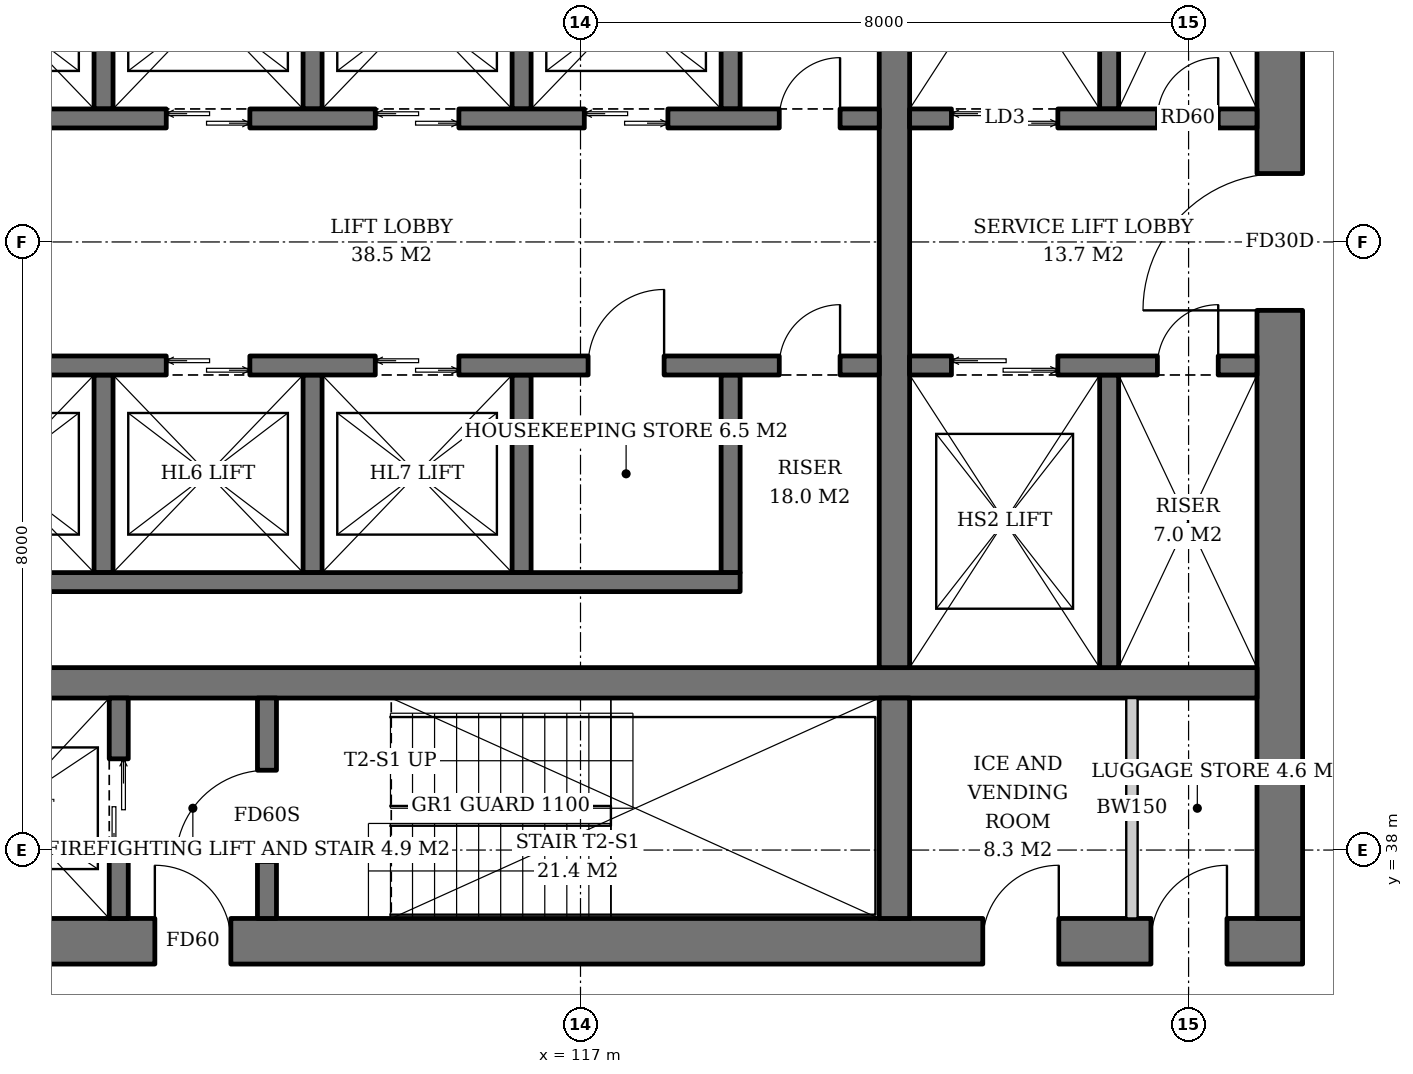
"""IFC4 building model, lengths in metres.
Left out: names, types, materials, properties, quantities, classifications, styles, units other than length and angle.
Written with IfcOpenShell. Run it as: python <this file> out.ifc"""

import sys

from ifc_helpers import new_model, si_unit, direction, frame, frame_2d, origin, place, context, subcontext, project, spatial, rectangle, extrude, element, fill, save


model = new_model("IFC4")
c1 = context("Model", 3, precision=1e-05, world=origin(), true_north=direction((0.0, 1.0)))
c2 = subcontext(c1, "Body", "Model", "MODEL_VIEW")
j1 = project(units=[si_unit("LENGTHUNIT", "METRE"), si_unit("PLANEANGLEUNIT", "RADIAN")], contexts=[c1])
p1 = place(None, origin())
s1 = spatial("IfcSite", under=j1, at=p1, CompositionType="ELEMENT")
p2 = place(p1, origin())
s2 = spatial("IfcBuilding", under=s1, at=p2, CompositionType="ELEMENT")
p3 = place(p2, frame((0.0, 0.0, 104.6)))
s3 = spatial("IfcBuildingStorey", under=s2, at=p3, CompositionType="ELEMENT", Elevation=104.6)
p4 = place(p3, frame((107.5, 36.8, 0.0), z_axis=(0.0, 0.0, 1.0), x_axis=(1.0, 0.0, 0.0)))
e1 = element("IfcWall", 1, at=p4, inside=s3, PredefinedType="SHEAR", context=c2, shape_type="SweptSolid", body=[
    extrude(rectangle(XDim=19.0, YDim=0.6, at=frame_2d((9.5, 0.0))), origin(), (0.0, 0.0, 1.0), 3.8),
])
p5 = place(p4, frame((3.9, 0.0, 0.0)))
e2 = element("IfcOpeningElement", 2, at=p5, cuts=e1, PredefinedType="OPENING", context=c2, shape_type="SweptSolid", body=[
    extrude(rectangle(XDim=1.0, YDim=2.1, at=frame_2d((0.5, 1.05))), frame((0.0, 0.31, 0.0), z_axis=(0.0, -1.0, 0.0), x_axis=(1.0, 0.0, 0.0)), (0.0, 0.0, 1.0), 0.62),
])
p6 = place(p4, frame((14.792, 0.0, 0.0)))
e3 = element("IfcOpeningElement", 3, at=p6, cuts=e1, PredefinedType="OPENING", context=c2, shape_type="SweptSolid", body=[
    extrude(rectangle(XDim=1.0, YDim=2.1, at=frame_2d((0.5, 1.05))), frame((0.0, 0.31, 0.0), z_axis=(0.0, -1.0, 0.0), x_axis=(1.0, 0.0, 0.0)), (0.0, 0.0, 1.0), 0.62),
])
p7 = place(p4, frame((17.005, 0.0, 0.0)))
e4 = element("IfcOpeningElement", 4, at=p7, cuts=e1, PredefinedType="OPENING", context=c2, shape_type="SweptSolid", body=[
    extrude(rectangle(XDim=1.0, YDim=2.1, at=frame_2d((0.5, 1.05))), frame((0.0, 0.31, 0.0), z_axis=(0.0, -1.0, 0.0), x_axis=(1.0, 0.0, 0.0)), (0.0, 0.0, 1.0), 0.62),
])
p8 = place(p3, frame((126.2, 37.1, 0.0), z_axis=(0.0, 0.0, 1.0), x_axis=(0.0, 1.0, 0.0)))
e5 = element("IfcWall", 5, at=p8, inside=s3, PredefinedType="SHEAR", context=c2, shape_type="SweptSolid", body=[
    extrude(rectangle(XDim=17.8, YDim=0.6, at=frame_2d((8.9, 0.0))), origin(), (0.0, 0.0, 1.0), 3.8),
])
p9 = place(p8, frame((8.0, 0.0, 0.0)))
e6 = element("IfcOpeningElement", 6, at=p9, cuts=e5, PredefinedType="OPENING", context=c2, shape_type="SweptSolid", body=[
    extrude(rectangle(XDim=1.8, YDim=2.4, at=frame_2d((0.9, 1.2))), frame((0.0, 0.31, 0.0), z_axis=(0.0, -1.0, 0.0), x_axis=(1.0, 0.0, 0.0)), (0.0, 0.0, 1.0), 0.62),
])
p10 = place(p3, frame((108.1, 40.2, 0.0), z_axis=(0.0, 0.0, 1.0), x_axis=(1.0, 0.0, 0.0)))
e7 = element("IfcWall", 7, at=p10, inside=s3, PredefinedType="SHEAR", context=c2, shape_type="SweptSolid", body=[
    extrude(rectangle(XDim=17.8, YDim=0.4, at=frame_2d((8.9, 0.0))), origin(), (0.0, 0.0, 1.0), 3.8),
])
p11 = place(p3, frame((121.13, 37.1, 0.0), z_axis=(0.0, 0.0, 1.0), x_axis=(0.0, 1.0, 0.0)))
e8 = element("IfcWall", 8, at=p11, inside=s3, PredefinedType="SHEAR", context=c2, shape_type="SweptSolid", body=[
    extrude(rectangle(XDim=2.9, YDim=0.4, at=frame_2d((1.45, 0.0))), origin(), (0.0, 0.0, 1.0), 3.8),
])
p12 = place(p3, frame((121.13, 40.4, 0.0), z_axis=(0.0, 0.0, 1.0), x_axis=(0.0, 1.0, 0.0)))
e9 = element("IfcWall", 9, at=p12, inside=s3, PredefinedType="SHEAR", context=c2, shape_type="SweptSolid", body=[
    extrude(rectangle(XDim=11.2, YDim=0.4, at=frame_2d((5.6, 0.0))), origin(), (0.0, 0.0, 1.0), 3.8),
])
p13 = place(p3, frame((110.925, 37.1, 0.0), z_axis=(0.0, 0.0, 1.0), x_axis=(0.0, 1.0, 0.0)))
e10 = element("IfcWall", 10, at=p13, inside=s3, PredefinedType="SHEAR", context=c2, shape_type="SweptSolid", body=[
    extrude(rectangle(XDim=2.9, YDim=0.25, at=frame_2d((1.45, 0.0))), origin(), (0.0, 0.0, 1.0), 3.8),
])
p14 = place(p13, frame((0.8, 0.0, 0.0)))
e11 = element("IfcOpeningElement", 11, at=p14, cuts=e10, PredefinedType="OPENING", context=c2, shape_type="SweptSolid", body=[
    extrude(rectangle(XDim=1.3, YDim=2.2, at=frame_2d((0.65, 1.1))), frame((0.0, 0.135, 0.0), z_axis=(0.0, -1.0, 0.0), x_axis=(1.0, 0.0, 0.0)), (0.0, 0.0, 1.0), 0.27),
])
p15 = place(p3, frame((112.875, 37.1, 0.0), z_axis=(0.0, 0.0, 1.0), x_axis=(0.0, 1.0, 0.0)))
e12 = element("IfcWall", 12, at=p15, inside=s3, PredefinedType="SHEAR", context=c2, shape_type="SweptSolid", body=[
    extrude(rectangle(XDim=2.9, YDim=0.25, at=frame_2d((1.45, 0.0))), origin(), (0.0, 0.0, 1.0), 3.8),
])
p16 = place(p15, frame((0.75, 0.0, 0.0)))
e13 = element("IfcOpeningElement", 13, at=p16, cuts=e12, PredefinedType="OPENING", context=c2, shape_type="SweptSolid", body=[
    extrude(rectangle(XDim=1.2, YDim=2.1, at=frame_2d((0.6, 1.05))), frame((0.0, 0.135, 0.0), z_axis=(0.0, -1.0, 0.0), x_axis=(1.0, 0.0, 0.0)), (0.0, 0.0, 1.0), 0.27),
])
for number, where, z_axis, x_axis in (
    (14, (110.725, 47.75, 0.0), (0.0, 0.0, 1.0), (0.0, 1.0, 0.0)),
    (15, (113.475, 47.75, 0.0), (0.0, 0.0, 1.0), (0.0, 1.0, 0.0)),
    (16, (116.225, 47.75, 0.0), (0.0, 0.0, 1.0), (0.0, 1.0, 0.0)),
    (17, (118.975, 47.75, 0.0), (0.0, 0.0, 1.0), (0.0, 1.0, 0.0)),
):
    element("IfcWall", number, at=place(p3, frame(where, z_axis=z_axis, x_axis=x_axis)), inside=s3, PredefinedType="SHEAR", context=c2, shape_type="SweptSolid", body=[
        extrude(rectangle(XDim=2.6, YDim=0.25, at=frame_2d((1.3, 0.0))), origin(), (0.0, 0.0, 1.0), 3.8),
    ])
p17 = place(p3, frame((108.1, 47.625, 0.0), z_axis=(0.0, 0.0, 1.0), x_axis=(1.0, 0.0, 0.0)))
e18 = element("IfcWall", 18, at=p17, inside=s3, PredefinedType="SHEAR", context=c2, shape_type="SweptSolid", body=[
    extrude(rectangle(XDim=12.83, YDim=0.25, at=frame_2d((6.415, 0.0))), origin(), (0.0, 0.0, 1.0), 3.8),
])
p18 = place(p17, frame((0.7, 0.0, 0.0)))
e19 = element("IfcOpeningElement", 19, at=p18, cuts=e18, PredefinedType="OPENING", context=c2, shape_type="SweptSolid", body=[
    extrude(rectangle(XDim=1.1, YDim=2.2, at=frame_2d((0.55, 1.1))), frame((0.0, 0.135, 0.0), z_axis=(0.0, -1.0, 0.0), x_axis=(1.0, 0.0, 0.0)), (0.0, 0.0, 1.0), 0.27),
])
p19 = place(p17, frame((3.45, 0.0, 0.0)))
e20 = element("IfcOpeningElement", 20, at=p19, cuts=e18, PredefinedType="OPENING", context=c2, shape_type="SweptSolid", body=[
    extrude(rectangle(XDim=1.1, YDim=2.2, at=frame_2d((0.55, 1.1))), frame((0.0, 0.135, 0.0), z_axis=(0.0, -1.0, 0.0), x_axis=(1.0, 0.0, 0.0)), (0.0, 0.0, 1.0), 0.27),
])
p20 = place(p17, frame((6.2, 0.0, 0.0)))
e21 = element("IfcOpeningElement", 21, at=p20, cuts=e18, PredefinedType="OPENING", context=c2, shape_type="SweptSolid", body=[
    extrude(rectangle(XDim=1.1, YDim=2.2, at=frame_2d((0.55, 1.1))), frame((0.0, 0.135, 0.0), z_axis=(0.0, -1.0, 0.0), x_axis=(1.0, 0.0, 0.0)), (0.0, 0.0, 1.0), 0.27),
])
p21 = place(p17, frame((8.95, 0.0, 0.0)))
e22 = element("IfcOpeningElement", 22, at=p21, cuts=e18, PredefinedType="OPENING", context=c2, shape_type="SweptSolid", body=[
    extrude(rectangle(XDim=1.1, YDim=2.2, at=frame_2d((0.55, 1.1))), frame((0.0, 0.135, 0.0), z_axis=(0.0, -1.0, 0.0), x_axis=(1.0, 0.0, 0.0)), (0.0, 0.0, 1.0), 0.27),
])
p22 = place(p17, frame((11.515, 0.0, 0.0)))
e23 = element("IfcOpeningElement", 23, at=p22, cuts=e18, PredefinedType="OPENING", context=c2, shape_type="SweptSolid", body=[
    extrude(rectangle(XDim=0.8, YDim=2.0, at=frame_2d((0.4, 1.0))), frame((0.0, 0.135, 0.0), z_axis=(0.0, -1.0, 0.0), x_axis=(1.0, 0.0, 0.0)), (0.0, 0.0, 1.0), 0.27),
])
for number, where, z_axis, x_axis in (
    (24, (110.725, 44.25, 0.0), (0.0, 0.0, 1.0), (0.0, -1.0, 0.0)),
    (25, (113.475, 44.25, 0.0), (0.0, 0.0, 1.0), (0.0, -1.0, 0.0)),
    (26, (116.225, 44.25, 0.0), (0.0, 0.0, 1.0), (0.0, -1.0, 0.0)),
    (27, (118.975, 44.25, 0.0), (0.0, 0.0, 1.0), (0.0, -1.0, 0.0)),
):
    element("IfcWall", number, at=place(p3, frame(where, z_axis=z_axis, x_axis=x_axis)), inside=s3, PredefinedType="SHEAR", context=c2, shape_type="SweptSolid", body=[
        extrude(rectangle(XDim=2.6, YDim=0.25, at=frame_2d((1.3, 0.0))), origin(), (0.0, 0.0, 1.0), 3.8),
    ])
p23 = place(p3, frame((108.1, 41.525, 0.0), z_axis=(0.0, 0.0, 1.0), x_axis=(1.0, 0.0, 0.0)))
e28 = element("IfcWall", 28, at=p23, inside=s3, PredefinedType="SHEAR", context=c2, shape_type="SweptSolid", body=[
    extrude(rectangle(XDim=11.0, YDim=0.25, at=frame_2d((5.5, 0.0))), origin(), (0.0, 0.0, 1.0), 3.8),
])
p24 = place(p3, frame((108.1, 44.375, 0.0), z_axis=(0.0, 0.0, 1.0), x_axis=(1.0, 0.0, 0.0)))
e29 = element("IfcWall", 29, at=p24, inside=s3, PredefinedType="SHEAR", context=c2, shape_type="SweptSolid", body=[
    extrude(rectangle(XDim=12.83, YDim=0.25, at=frame_2d((6.415, 0.0))), origin(), (0.0, 0.0, 1.0), 3.8),
])
p25 = place(p24, frame((0.7, 0.0, 0.0)))
e30 = element("IfcOpeningElement", 30, at=p25, cuts=e29, PredefinedType="OPENING", context=c2, shape_type="SweptSolid", body=[
    extrude(rectangle(XDim=1.1, YDim=2.2, at=frame_2d((0.55, 1.1))), frame((0.0, 0.135, 0.0), z_axis=(0.0, -1.0, 0.0), x_axis=(1.0, 0.0, 0.0)), (0.0, 0.0, 1.0), 0.27),
])
p26 = place(p24, frame((3.45, 0.0, 0.0)))
e31 = element("IfcOpeningElement", 31, at=p26, cuts=e29, PredefinedType="OPENING", context=c2, shape_type="SweptSolid", body=[
    extrude(rectangle(XDim=1.1, YDim=2.2, at=frame_2d((0.55, 1.1))), frame((0.0, 0.135, 0.0), z_axis=(0.0, -1.0, 0.0), x_axis=(1.0, 0.0, 0.0)), (0.0, 0.0, 1.0), 0.27),
])
p27 = place(p24, frame((6.2, 0.0, 0.0)))
e32 = element("IfcOpeningElement", 32, at=p27, cuts=e29, PredefinedType="OPENING", context=c2, shape_type="SweptSolid", body=[
    extrude(rectangle(XDim=1.1, YDim=2.2, at=frame_2d((0.55, 1.1))), frame((0.0, 0.135, 0.0), z_axis=(0.0, -1.0, 0.0), x_axis=(1.0, 0.0, 0.0)), (0.0, 0.0, 1.0), 0.27),
])
p28 = place(p24, frame((9.0, 0.0, 0.0)))
e33 = element("IfcOpeningElement", 33, at=p28, cuts=e29, PredefinedType="OPENING", context=c2, shape_type="SweptSolid", body=[
    extrude(rectangle(XDim=1.0, YDim=2.1, at=frame_2d((0.5, 1.05))), frame((0.0, 0.135, 0.0), z_axis=(0.0, -1.0, 0.0), x_axis=(1.0, 0.0, 0.0)), (0.0, 0.0, 1.0), 0.27),
])
p29 = place(p24, frame((11.515, 0.0, 0.0)))
e34 = element("IfcOpeningElement", 34, at=p29, cuts=e29, PredefinedType="OPENING", context=c2, shape_type="SweptSolid", body=[
    extrude(rectangle(XDim=0.8, YDim=2.0, at=frame_2d((0.4, 1.0))), frame((0.0, 0.135, 0.0), z_axis=(0.0, -1.0, 0.0), x_axis=(1.0, 0.0, 0.0)), (0.0, 0.0, 1.0), 0.27),
])
p30 = place(p3, frame((123.955, 47.75, 0.0), z_axis=(0.0, 0.0, 1.0), x_axis=(0.0, 1.0, 0.0)))
e35 = element("IfcWall", 35, at=p30, inside=s3, PredefinedType="SHEAR", context=c2, shape_type="SweptSolid", body=[
    extrude(rectangle(XDim=3.85, YDim=0.25, at=frame_2d((1.925, 0.0))), origin(), (0.0, 0.0, 1.0), 3.8),
])
p31 = place(p3, frame((121.33, 47.625, 0.0), z_axis=(0.0, 0.0, 1.0), x_axis=(1.0, 0.0, 0.0)))
e36 = element("IfcWall", 36, at=p31, inside=s3, PredefinedType="SHEAR", context=c2, shape_type="SweptSolid", body=[
    extrude(rectangle(XDim=4.57, YDim=0.25, at=frame_2d((2.285, 0.0))), origin(), (0.0, 0.0, 1.0), 3.8),
])
p32 = place(p31, frame((0.55, 0.0, 0.0)))
e37 = element("IfcOpeningElement", 37, at=p32, cuts=e36, PredefinedType="OPENING", context=c2, shape_type="SweptSolid", body=[
    extrude(rectangle(XDim=1.4, YDim=2.4, at=frame_2d((0.7, 1.2))), frame((0.0, 0.135, 0.0), z_axis=(0.0, -1.0, 0.0), x_axis=(1.0, 0.0, 0.0)), (0.0, 0.0, 1.0), 0.27),
])
p33 = place(p31, frame((3.26, 0.0, 0.0)))
e38 = element("IfcOpeningElement", 38, at=p33, cuts=e36, PredefinedType="OPENING", context=c2, shape_type="SweptSolid", body=[
    extrude(rectangle(XDim=0.8, YDim=2.0, at=frame_2d((0.4, 1.0))), frame((0.0, 0.135, 0.0), z_axis=(0.0, -1.0, 0.0), x_axis=(1.0, 0.0, 0.0)), (0.0, 0.0, 1.0), 0.27),
])
p34 = place(p3, frame((123.955, 44.25, 0.0), z_axis=(0.0, 0.0, 1.0), x_axis=(0.0, -1.0, 0.0)))
e39 = element("IfcWall", 39, at=p34, inside=s3, PredefinedType="SHEAR", context=c2, shape_type="SweptSolid", body=[
    extrude(rectangle(XDim=3.85, YDim=0.25, at=frame_2d((1.925, 0.0))), origin(), (0.0, 0.0, 1.0), 3.8),
])
p35 = place(p3, frame((121.33, 44.375, 0.0), z_axis=(0.0, 0.0, 1.0), x_axis=(1.0, 0.0, 0.0)))
e40 = element("IfcWall", 40, at=p35, inside=s3, PredefinedType="SHEAR", context=c2, shape_type="SweptSolid", body=[
    extrude(rectangle(XDim=4.57, YDim=0.25, at=frame_2d((2.285, 0.0))), origin(), (0.0, 0.0, 1.0), 3.8),
])
p36 = place(p35, frame((0.55, 0.0, 0.0)))
e41 = element("IfcOpeningElement", 41, at=p36, cuts=e40, PredefinedType="OPENING", context=c2, shape_type="SweptSolid", body=[
    extrude(rectangle(XDim=1.4, YDim=2.4, at=frame_2d((0.7, 1.2))), frame((0.0, 0.135, 0.0), z_axis=(0.0, -1.0, 0.0), x_axis=(1.0, 0.0, 0.0)), (0.0, 0.0, 1.0), 0.27),
])
p37 = place(p35, frame((3.26, 0.0, 0.0)))
e42 = element("IfcOpeningElement", 42, at=p37, cuts=e40, PredefinedType="OPENING", context=c2, shape_type="SweptSolid", body=[
    extrude(rectangle(XDim=0.8, YDim=2.0, at=frame_2d((0.4, 1.0))), frame((0.0, 0.135, 0.0), z_axis=(0.0, -1.0, 0.0), x_axis=(1.0, 0.0, 0.0)), (0.0, 0.0, 1.0), 0.27),
])
p38 = place(p3, frame((124.255, 37.1, 0.0), z_axis=(0.0, 0.0, 1.0), x_axis=(0.0, 1.0, 0.0)))
e43 = element("IfcWall", 43, at=p38, inside=s3, PredefinedType="SOLIDWALL", context=c2, shape_type="SweptSolid", body=[
    extrude(rectangle(XDim=2.9, YDim=0.15, at=frame_2d((1.45, 0.0))), origin(), (0.0, 0.0, 1.0), 3.6),
])
p39 = place(p14, origin())
e44 = element("IfcDoor", 44, at=p39, inside=s3, OperationType="DOUBLE_DOOR_SLIDING", PredefinedType="DOOR", context=c2, shape_type="SweptSolid", body=[
    extrude(rectangle(XDim=1.3, YDim=2.2, at=frame_2d((0.65, 1.1))), frame((0.0, 0.025, 0.0), z_axis=(0.0, -1.0, 0.0), x_axis=(1.0, 0.0, 0.0)), (0.0, 0.0, 1.0), 0.05),
])
fill(e11, e44)
p40 = place(p16, origin())
e45 = element("IfcDoor", 45, at=p40, inside=s3, OperationType="SINGLE_SWING_LEFT", PredefinedType="DOOR", context=c2, shape_type="SweptSolid", body=[
    extrude(rectangle(XDim=1.2, YDim=2.1, at=frame_2d((0.6, 1.05))), frame((0.0, 0.025, 0.0), z_axis=(0.0, -1.0, 0.0), x_axis=(1.0, 0.0, 0.0)), (0.0, 0.0, 1.0), 0.05),
])
fill(e13, e45)
p41 = place(p19, origin())
e46 = element("IfcDoor", 46, at=p41, inside=s3, OperationType="DOUBLE_DOOR_SLIDING", PredefinedType="DOOR", context=c2, shape_type="SweptSolid", body=[
    extrude(rectangle(XDim=1.1, YDim=2.2, at=frame_2d((0.55, 1.1))), frame((0.0, 0.025, 0.0), z_axis=(0.0, -1.0, 0.0), x_axis=(1.0, 0.0, 0.0)), (0.0, 0.0, 1.0), 0.05),
])
fill(e20, e46)
p42 = place(p20, origin())
e47 = element("IfcDoor", 47, at=p42, inside=s3, OperationType="DOUBLE_DOOR_SLIDING", PredefinedType="DOOR", context=c2, shape_type="SweptSolid", body=[
    extrude(rectangle(XDim=1.1, YDim=2.2, at=frame_2d((0.55, 1.1))), frame((0.0, 0.025, 0.0), z_axis=(0.0, -1.0, 0.0), x_axis=(1.0, 0.0, 0.0)), (0.0, 0.0, 1.0), 0.05),
])
fill(e21, e47)
p43 = place(p21, origin())
e48 = element("IfcDoor", 48, at=p43, inside=s3, OperationType="DOUBLE_DOOR_SLIDING", PredefinedType="DOOR", context=c2, shape_type="SweptSolid", body=[
    extrude(rectangle(XDim=1.1, YDim=2.2, at=frame_2d((0.55, 1.1))), frame((0.0, 0.025, 0.0), z_axis=(0.0, -1.0, 0.0), x_axis=(1.0, 0.0, 0.0)), (0.0, 0.0, 1.0), 0.05),
])
fill(e22, e48)
p44 = place(p22, origin())
e49 = element("IfcDoor", 49, at=p44, inside=s3, OperationType="SINGLE_SWING_RIGHT", PredefinedType="DOOR", context=c2, shape_type="SweptSolid", body=[
    extrude(rectangle(XDim=0.8, YDim=2.0, at=frame_2d((0.4, 1.0))), frame((0.0, 0.025, 0.0), z_axis=(0.0, -1.0, 0.0), x_axis=(1.0, 0.0, 0.0)), (0.0, 0.0, 1.0), 0.05),
])
fill(e23, e49)
p45 = place(p26, origin())
e50 = element("IfcDoor", 50, at=p45, inside=s3, OperationType="DOUBLE_DOOR_SLIDING", PredefinedType="DOOR", context=c2, shape_type="SweptSolid", body=[
    extrude(rectangle(XDim=1.1, YDim=2.2, at=frame_2d((0.55, 1.1))), frame((0.0, 0.025, 0.0), z_axis=(0.0, -1.0, 0.0), x_axis=(1.0, 0.0, 0.0)), (0.0, 0.0, 1.0), 0.05),
])
fill(e31, e50)
p46 = place(p27, origin())
e51 = element("IfcDoor", 51, at=p46, inside=s3, OperationType="DOUBLE_DOOR_SLIDING", PredefinedType="DOOR", context=c2, shape_type="SweptSolid", body=[
    extrude(rectangle(XDim=1.1, YDim=2.2, at=frame_2d((0.55, 1.1))), frame((0.0, 0.025, 0.0), z_axis=(0.0, -1.0, 0.0), x_axis=(1.0, 0.0, 0.0)), (0.0, 0.0, 1.0), 0.05),
])
fill(e32, e51)
p47 = place(p28, origin())
e52 = element("IfcDoor", 52, at=p47, inside=s3, OperationType="SINGLE_SWING_RIGHT", PredefinedType="DOOR", context=c2, shape_type="SweptSolid", body=[
    extrude(rectangle(XDim=1.0, YDim=2.1, at=frame_2d((0.5, 1.05))), frame((0.0, 0.025, 0.0), z_axis=(0.0, -1.0, 0.0), x_axis=(1.0, 0.0, 0.0)), (0.0, 0.0, 1.0), 0.05),
])
fill(e33, e52)
p48 = place(p29, origin())
e53 = element("IfcDoor", 53, at=p48, inside=s3, OperationType="SINGLE_SWING_RIGHT", PredefinedType="DOOR", context=c2, shape_type="SweptSolid", body=[
    extrude(rectangle(XDim=0.8, YDim=2.0, at=frame_2d((0.4, 1.0))), frame((0.0, 0.025, 0.0), z_axis=(0.0, -1.0, 0.0), x_axis=(1.0, 0.0, 0.0)), (0.0, 0.0, 1.0), 0.05),
])
fill(e34, e53)
p49 = place(p32, origin())
e54 = element("IfcDoor", 54, at=p49, inside=s3, OperationType="DOUBLE_DOOR_SLIDING", PredefinedType="DOOR", context=c2, shape_type="SweptSolid", body=[
    extrude(rectangle(XDim=1.4, YDim=2.4, at=frame_2d((0.7, 1.2))), frame((0.0, 0.025, 0.0), z_axis=(0.0, -1.0, 0.0), x_axis=(1.0, 0.0, 0.0)), (0.0, 0.0, 1.0), 0.05),
])
fill(e37, e54)
p50 = place(p33, origin())
e55 = element("IfcDoor", 55, at=p50, inside=s3, OperationType="SINGLE_SWING_RIGHT", PredefinedType="DOOR", context=c2, shape_type="SweptSolid", body=[
    extrude(rectangle(XDim=0.8, YDim=2.0, at=frame_2d((0.4, 1.0))), frame((0.0, 0.025, 0.0), z_axis=(0.0, -1.0, 0.0), x_axis=(1.0, 0.0, 0.0)), (0.0, 0.0, 1.0), 0.05),
])
fill(e38, e55)
p51 = place(p36, origin())
e56 = element("IfcDoor", 56, at=p51, inside=s3, OperationType="DOUBLE_DOOR_SLIDING", PredefinedType="DOOR", context=c2, shape_type="SweptSolid", body=[
    extrude(rectangle(XDim=1.4, YDim=2.4, at=frame_2d((0.7, 1.2))), frame((0.0, 0.025, 0.0), z_axis=(0.0, -1.0, 0.0), x_axis=(1.0, 0.0, 0.0)), (0.0, 0.0, 1.0), 0.05),
])
fill(e41, e56)
p52 = place(p37, origin())
e57 = element("IfcDoor", 57, at=p52, inside=s3, OperationType="SINGLE_SWING_RIGHT", PredefinedType="DOOR", context=c2, shape_type="SweptSolid", body=[
    extrude(rectangle(XDim=0.8, YDim=2.0, at=frame_2d((0.4, 1.0))), frame((0.0, 0.025, 0.0), z_axis=(0.0, -1.0, 0.0), x_axis=(1.0, 0.0, 0.0)), (0.0, 0.0, 1.0), 0.05),
])
fill(e42, e57)
p53 = place(p5, origin())
e58 = element("IfcDoor", 58, at=p53, inside=s3, OperationType="SINGLE_SWING_LEFT", PredefinedType="DOOR", context=c2, shape_type="SweptSolid", body=[
    extrude(rectangle(XDim=1.0, YDim=2.1, at=frame_2d((0.5, 1.05))), frame((0.0, 0.025, 0.0), z_axis=(0.0, -1.0, 0.0), x_axis=(1.0, 0.0, 0.0)), (0.0, 0.0, 1.0), 0.05),
])
fill(e2, e58)
p54 = place(p9, origin())
e59 = element("IfcDoor", 59, at=p54, inside=s3, OperationType="DOUBLE_DOOR_SINGLE_SWING", PredefinedType="DOOR", context=c2, shape_type="SweptSolid", body=[
    extrude(rectangle(XDim=1.8, YDim=2.4, at=frame_2d((0.9, 1.2))), frame((0.0, 0.025, 0.0), z_axis=(0.0, -1.0, 0.0), x_axis=(1.0, 0.0, 0.0)), (0.0, 0.0, 1.0), 0.05),
])
fill(e6, e59)
p55 = place(p6, origin())
e60 = element("IfcDoor", 60, at=p55, inside=s3, OperationType="SINGLE_SWING_RIGHT", PredefinedType="DOOR", context=c2, shape_type="SweptSolid", body=[
    extrude(rectangle(XDim=1.0, YDim=2.1, at=frame_2d((0.5, 1.05))), frame((0.0, 0.29, 0.0), z_axis=(0.0, -1.0, 0.0), x_axis=(1.0, 0.0, 0.0)), (0.0, 0.0, 1.0), 0.05),
])
fill(e3, e60)
p56 = place(p7, origin())
e61 = element("IfcDoor", 61, at=p56, inside=s3, OperationType="SINGLE_SWING_RIGHT", PredefinedType="DOOR", context=c2, shape_type="SweptSolid", body=[
    extrude(rectangle(XDim=1.0, YDim=2.1, at=frame_2d((0.5, 1.05))), frame((0.0, 0.29, 0.0), z_axis=(0.0, -1.0, 0.0), x_axis=(1.0, 0.0, 0.0)), (0.0, 0.0, 1.0), 0.05),
])
fill(e4, e61)
save(model, sys.argv[1])
